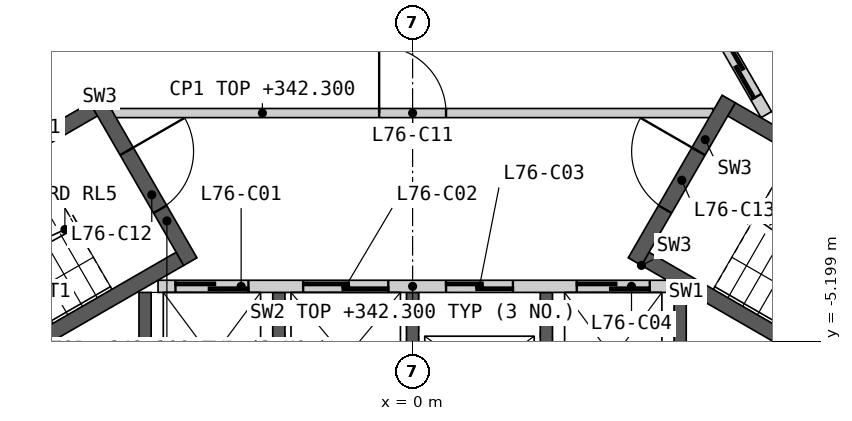
"""IFC4 building model, lengths in metres.
Left out: names, types, materials, properties, quantities, classifications, styles, units other than length and angle.
Written with IfcOpenShell. Run it as: python <this file> out.ifc"""

import sys

from ifc_helpers import new_model, si_unit, direction, frame, frame_2d, origin, place, context, subcontext, project, spatial, polyline, rectangle, outline, extrude, element, fill, save


model = new_model("IFC4")
c1 = context("Model", 3, precision=1e-05, world=origin(), true_north=direction((0.0, 1.0)))
c2 = subcontext(c1, "Body", "Model", "MODEL_VIEW")
j1 = project(units=[si_unit("LENGTHUNIT", "METRE"), si_unit("PLANEANGLEUNIT", "RADIAN")], contexts=[c1])
p1 = place(None, origin())
s1 = spatial("IfcSite", under=j1, at=p1, CompositionType="ELEMENT")
p2 = place(p1, origin())
s2 = spatial("IfcBuilding", under=s1, at=p2, CompositionType="ELEMENT")
p3 = place(p2, frame((0.0, 0.0, 339.2)))
s3 = spatial("IfcBuildingStorey", under=s2, at=p3, CompositionType="ELEMENT", Elevation=339.2)
p4 = place(p3, origin())
e1 = element("IfcWall", 1, at=p4, inside=s3, PredefinedType="SHEAR", context=c2, shape_type="SweptSolid", body=[
    extrude(outline(polyline([(4.5, -4.4), (4.5, -6.906), (-4.5, -6.906), (-4.5, -4.4), (-4.3, -4.4), (-4.3, -6.7), (-2.3, -6.7), (-2.3, -4.4), (-2.1, -4.4), (-2.1, -6.7), (-0.1, -6.7), (-0.1, -4.4), (0.1, -4.4), (0.1, -6.7), (2.1, -6.7), (2.1, -4.4), (2.3, -4.4), (2.3, -6.7), (4.3, -6.7), (4.3, -4.4), (4.5, -4.4)])), origin(), (0.0, 0.0, 1.0), 3.1),
])
p5 = place(p3, frame((-4.187, -4.3, 0.0), z_axis=(0.0, 0.0, 1.0), x_axis=(1.0, 0.0, 0.0)))
e2 = element("IfcWall", 2, at=p5, inside=s3, PredefinedType="SOLIDWALL", context=c2, shape_type="SweptSolid", body=[
    extrude(rectangle(XDim=8.373, YDim=0.2, at=frame_2d((4.187, 0.0))), origin(), (0.0, 0.0, 1.0), 3.1),
])
p6 = place(p5, frame((0.287, 0.0, 0.0)))
e3 = element("IfcOpeningElement", 3, at=p6, cuts=e2, PredefinedType="OPENING", context=c2, shape_type="SweptSolid", body=[
    extrude(rectangle(XDim=1.2, YDim=2.1, at=frame_2d((0.6, 1.05))), frame((0.0, 0.11, 0.0), z_axis=(0.0, -1.0, 0.0), x_axis=(1.0, 0.0, 0.0)), (0.0, 0.0, 1.0), 0.22),
])
p7 = place(p5, frame((2.387, 0.0, 0.0)))
e4 = element("IfcOpeningElement", 4, at=p7, cuts=e2, PredefinedType="OPENING", context=c2, shape_type="SweptSolid", body=[
    extrude(rectangle(XDim=1.4, YDim=2.1, at=frame_2d((0.7, 1.05))), frame((0.0, 0.11, 0.0), z_axis=(0.0, -1.0, 0.0), x_axis=(1.0, 0.0, 0.0)), (0.0, 0.0, 1.0), 0.22),
])
p8 = place(p5, frame((4.737, 0.0, 0.0)))
e5 = element("IfcOpeningElement", 5, at=p8, cuts=e2, PredefinedType="OPENING", context=c2, shape_type="SweptSolid", body=[
    extrude(rectangle(XDim=1.1, YDim=2.1, at=frame_2d((0.55, 1.05))), frame((0.0, 0.11, 0.0), z_axis=(0.0, -1.0, 0.0), x_axis=(1.0, 0.0, 0.0)), (0.0, 0.0, 1.0), 0.22),
])
p9 = place(p5, frame((6.887, 0.0, 0.0)))
e6 = element("IfcOpeningElement", 6, at=p9, cuts=e2, PredefinedType="OPENING", context=c2, shape_type="SweptSolid", body=[
    extrude(rectangle(XDim=1.2, YDim=2.1, at=frame_2d((0.6, 1.05))), frame((0.0, 0.11, 0.0), z_axis=(0.0, -1.0, 0.0), x_axis=(1.0, 0.0, 0.0)), (0.0, 0.0, 1.0), 0.22),
])
p10 = place(p3, origin())
e7 = element("IfcWall", 7, at=p10, inside=s3, PredefinedType="SHEAR", context=c2, shape_type="SweptSolid", body=[
    extrude(outline(polyline([(1.561, 6.097), (3.731, 7.35), (8.231, -0.444), (6.061, -1.697), (5.96, -1.524), (7.952, -0.374), (6.952, 1.358), (4.96, 0.208), (4.861, 0.381), (6.852, 1.531), (5.852, 3.263), (3.861, 2.113), (3.76, 2.287), (5.752, 3.437), (4.752, 5.169), (2.76, 4.019), (2.66, 4.192), (4.652, 5.342), (3.652, 7.074), (1.66, 5.924), (1.561, 6.097)])), origin(), (0.0, 0.0, 1.0), 3.1),
])
p11 = place(p3, frame((5.817, -1.476, 0.0), z_axis=(0.0, 0.0, 1.0), x_axis=(-0.500002616675, 0.866023893041, 0.0)))
e8 = element("IfcWall", 8, at=p11, inside=s3, PredefinedType="SOLIDWALL", context=c2, shape_type="SweptSolid", body=[
    extrude(rectangle(XDim=8.373, YDim=0.2, at=frame_2d((4.187, 0.0))), origin(), (0.0, 0.0, 1.0), 3.1),
])
p12 = place(p11, frame((0.337, 0.0, 0.0)))
e9 = element("IfcOpeningElement", 9, at=p12, cuts=e8, PredefinedType="OPENING", context=c2, shape_type="SweptSolid", body=[
    extrude(rectangle(XDim=1.1, YDim=2.1, at=frame_2d((0.55, 1.05))), frame((0.0, 0.11, 0.0), z_axis=(0.0, -1.0, 0.0), x_axis=(1.0, 0.0, 0.0)), (0.0, 0.0, 1.0), 0.22),
])
p13 = place(p11, frame((2.537, 0.0, 0.0)))
e10 = element("IfcOpeningElement", 10, at=p13, cuts=e8, PredefinedType="OPENING", context=c2, shape_type="SweptSolid", body=[
    extrude(rectangle(XDim=1.1, YDim=2.1, at=frame_2d((0.55, 1.05))), frame((0.0, 0.11, 0.0), z_axis=(0.0, -1.0, 0.0), x_axis=(1.0, 0.0, 0.0)), (0.0, 0.0, 1.0), 0.22),
])
p14 = place(p11, frame((4.737, 0.0, 0.0)))
e11 = element("IfcOpeningElement", 11, at=p14, cuts=e8, PredefinedType="OPENING", context=c2, shape_type="SweptSolid", body=[
    extrude(rectangle(XDim=1.1, YDim=2.1, at=frame_2d((0.55, 1.05))), frame((0.0, 0.11, 0.0), z_axis=(0.0, -1.0, 0.0), x_axis=(1.0, 0.0, 0.0)), (0.0, 0.0, 1.0), 0.22),
])
p15 = place(p11, frame((7.037, 0.0, 0.0)))
e12 = element("IfcOpeningElement", 12, at=p15, cuts=e8, PredefinedType="OPENING", context=c2, shape_type="SweptSolid", body=[
    extrude(rectangle(XDim=0.9, YDim=2.1, at=frame_2d((0.45, 1.05))), frame((0.0, 0.11, 0.0), z_axis=(0.0, -1.0, 0.0), x_axis=(1.0, 0.0, 0.0)), (0.0, 0.0, 1.0), 0.22),
])
p16 = place(p3, frame((-4.941, -1.45, 0.0), z_axis=(0.0, 0.0, 1.0), x_axis=(1.0, 0.0, 0.0)))
e13 = element("IfcWall", 13, at=p16, inside=s3, PredefinedType="PARTITIONING", context=c2, shape_type="SweptSolid", body=[
    extrude(rectangle(XDim=9.882, YDim=0.15, at=frame_2d((4.941, 0.0))), origin(), (0.0, 0.0, 1.0), 3.1),
])
p17 = place(p16, frame((4.391, 0.0, 0.0)))
e14 = element("IfcOpeningElement", 14, at=p17, cuts=e13, PredefinedType="OPENING", context=c2, shape_type="SweptSolid", body=[
    extrude(rectangle(XDim=1.1, YDim=2.1, at=frame_2d((0.55, 1.05))), frame((0.0, 0.085, 0.0), z_axis=(0.0, -1.0, 0.0), x_axis=(1.0, 0.0, 0.0)), (0.0, 0.0, 1.0), 0.17),
])
p18 = place(p3, origin())
e15 = element("IfcWall", 15, at=p18, inside=s3, PredefinedType="SHEAR", context=c2, shape_type="SweptSolid", body=[
    extrude(outline(polyline([(-5.307, -1.281), (-10.374, -4.206), (-10.032, -4.298), (-5.182, -1.498), (-5.307, -1.281)])), origin(), (0.0, 0.0, 1.0), 3.1),
])
p19 = place(p3, origin())
e16 = element("IfcWall", 16, at=p19, inside=s3, PredefinedType="SHEAR", context=c2, shape_type="SweptSolid", body=[
    extrude(outline(polyline([(-8.738, -6.539), (-8.83, -6.881), (-3.763, -3.956), (-3.888, -3.739), (-8.738, -6.539)])), origin(), (0.0, 0.0, 1.0), 3.1),
])
p20 = place(p3, frame((-5.199, -1.219, 0.0), z_axis=(0.0, 0.0, 1.0), x_axis=(0.499982516597, -0.866035497597, 0.0)))
e17 = element("IfcWall", 17, at=p20, inside=s3, PredefinedType="SHEAR", context=c2, shape_type="SweptSolid", body=[
    extrude(rectangle(XDim=3.088, YDim=0.25, at=frame_2d((1.544, 0.0))), origin(), (0.0, 0.0, 1.0), 3.1),
])
p21 = place(p20, frame((0.994, 0.0, 0.0)))
e18 = element("IfcOpeningElement", 18, at=p21, cuts=e17, PredefinedType="OPENING", context=c2, shape_type="SweptSolid", body=[
    extrude(rectangle(XDim=1.1, YDim=2.1, at=frame_2d((0.55, 1.05))), frame((0.0, 0.135, 0.0), z_axis=(0.0, -1.0, 0.0), x_axis=(1.0, 0.0, 0.0)), (0.0, 0.0, 1.0), 0.27),
])
p22 = place(p3, origin())
e19 = element("IfcWall", 19, at=p22, inside=s3, PredefinedType="SHEAR", context=c2, shape_type="SweptSolid", body=[
    extrude(outline(polyline([(3.763, -3.956), (8.83, -6.881), (8.738, -6.539), (3.888, -3.739), (3.763, -3.956)])), origin(), (0.0, 0.0, 1.0), 3.1),
])
p23 = place(p3, origin())
e20 = element("IfcWall", 20, at=p23, inside=s3, PredefinedType="SHEAR", context=c2, shape_type="SweptSolid", body=[
    extrude(outline(polyline([(10.032, -4.298), (10.374, -4.206), (5.307, -1.281), (5.182, -1.498), (10.032, -4.298)])), origin(), (0.0, 0.0, 1.0), 3.1),
])
p24 = place(p3, frame((3.655, -3.893, 0.0), z_axis=(0.0, 0.0, 1.0), x_axis=(0.499982516597, 0.866035497597, 0.0)))
e21 = element("IfcWall", 21, at=p24, inside=s3, PredefinedType="SHEAR", context=c2, shape_type="SweptSolid", body=[
    extrude(rectangle(XDim=3.088, YDim=0.25, at=frame_2d((1.544, 0.0))), origin(), (0.0, 0.0, 1.0), 3.1),
])
p25 = place(p24, frame((0.994, 0.0, 0.0)))
e22 = element("IfcOpeningElement", 22, at=p25, cuts=e21, PredefinedType="OPENING", context=c2, shape_type="SweptSolid", body=[
    extrude(rectangle(XDim=1.1, YDim=2.1, at=frame_2d((0.55, 1.05))), frame((0.0, 0.135, 0.0), z_axis=(0.0, -1.0, 0.0), x_axis=(1.0, 0.0, 0.0)), (0.0, 0.0, 1.0), 0.27),
])
p26 = place(p3, frame((8.686, -0.634, 0.0), z_axis=(0.0, 0.0, 1.0), x_axis=(-0.50001836461, 0.866014800712, 0.0)))
e23 = element("IfcWall", 23, at=p26, inside=s3, PredefinedType="SHEAR", context=c2, shape_type="SweptSolid", body=[
    extrude(rectangle(XDim=10.451, YDim=0.6, at=frame_2d((5.225, 0.0))), origin(), (0.0, 0.0, 1.0), 3.1),
])
p27 = place(p6, origin())
e24 = element("IfcDoor", 24, at=p27, inside=s3, OperationType="SLIDING_TO_LEFT", PredefinedType="DOOR", context=c2, shape_type="SweptSolid", body=[
    extrude(rectangle(XDim=1.2, YDim=2.1, at=frame_2d((0.6, 1.05))), frame((0.0, 0.025, 0.0), z_axis=(0.0, -1.0, 0.0), x_axis=(1.0, 0.0, 0.0)), (0.0, 0.0, 1.0), 0.05),
])
fill(e3, e24)
p28 = place(p7, origin())
e25 = element("IfcDoor", 25, at=p28, inside=s3, OperationType="SLIDING_TO_LEFT", PredefinedType="DOOR", context=c2, shape_type="SweptSolid", body=[
    extrude(rectangle(XDim=1.4, YDim=2.1, at=frame_2d((0.7, 1.05))), frame((0.0, 0.025, 0.0), z_axis=(0.0, -1.0, 0.0), x_axis=(1.0, 0.0, 0.0)), (0.0, 0.0, 1.0), 0.05),
])
fill(e4, e25)
p29 = place(p8, origin())
e26 = element("IfcDoor", 26, at=p29, inside=s3, OperationType="SLIDING_TO_LEFT", PredefinedType="DOOR", context=c2, shape_type="SweptSolid", body=[
    extrude(rectangle(XDim=1.1, YDim=2.1, at=frame_2d((0.55, 1.05))), frame((0.0, 0.025, 0.0), z_axis=(0.0, -1.0, 0.0), x_axis=(1.0, 0.0, 0.0)), (0.0, 0.0, 1.0), 0.05),
])
fill(e5, e26)
p30 = place(p9, origin())
e27 = element("IfcDoor", 27, at=p30, inside=s3, OperationType="SLIDING_TO_LEFT", PredefinedType="DOOR", context=c2, shape_type="SweptSolid", body=[
    extrude(rectangle(XDim=1.2, YDim=2.1, at=frame_2d((0.6, 1.05))), frame((0.0, 0.025, 0.0), z_axis=(0.0, -1.0, 0.0), x_axis=(1.0, 0.0, 0.0)), (0.0, 0.0, 1.0), 0.05),
])
fill(e6, e27)
p31 = place(p12, origin())
e28 = element("IfcDoor", 28, at=p31, inside=s3, OperationType="SLIDING_TO_LEFT", PredefinedType="DOOR", context=c2, shape_type="SweptSolid", body=[
    extrude(rectangle(XDim=1.1, YDim=2.1, at=frame_2d((0.55, 1.05))), frame((0.0, 0.025, 0.0), z_axis=(0.0, -1.0, 0.0), x_axis=(1.0, 0.0, 0.0)), (0.0, 0.0, 1.0), 0.05),
])
fill(e9, e28)
p32 = place(p17, origin())
e29 = element("IfcDoor", 29, at=p32, inside=s3, OperationType="SINGLE_SWING_LEFT", PredefinedType="DOOR", context=c2, shape_type="SweptSolid", body=[
    extrude(rectangle(XDim=1.1, YDim=2.1, at=frame_2d((0.55, 1.05))), frame((0.0, 0.025, 0.0), z_axis=(0.0, -1.0, 0.0), x_axis=(1.0, 0.0, 0.0)), (0.0, 0.0, 1.0), 0.05),
])
fill(e14, e29)
p33 = place(p21, origin())
e30 = element("IfcDoor", 30, at=p33, inside=s3, OperationType="SINGLE_SWING_LEFT", PredefinedType="DOOR", context=c2, shape_type="SweptSolid", body=[
    extrude(rectangle(XDim=1.1, YDim=2.1, at=frame_2d((0.55, 1.05))), frame((0.0, 0.025, 0.0), z_axis=(0.0, -1.0, 0.0), x_axis=(1.0, 0.0, 0.0)), (0.0, 0.0, 1.0), 0.05),
])
fill(e18, e30)
p34 = place(p25, origin())
e31 = element("IfcDoor", 31, at=p34, inside=s3, OperationType="SINGLE_SWING_RIGHT", PredefinedType="DOOR", context=c2, shape_type="SweptSolid", body=[
    extrude(rectangle(XDim=1.1, YDim=2.1, at=frame_2d((0.55, 1.05))), frame((0.0, 0.025, 0.0), z_axis=(0.0, -1.0, 0.0), x_axis=(1.0, 0.0, 0.0)), (0.0, 0.0, 1.0), 0.05),
])
fill(e22, e31)
save(model, sys.argv[1])
